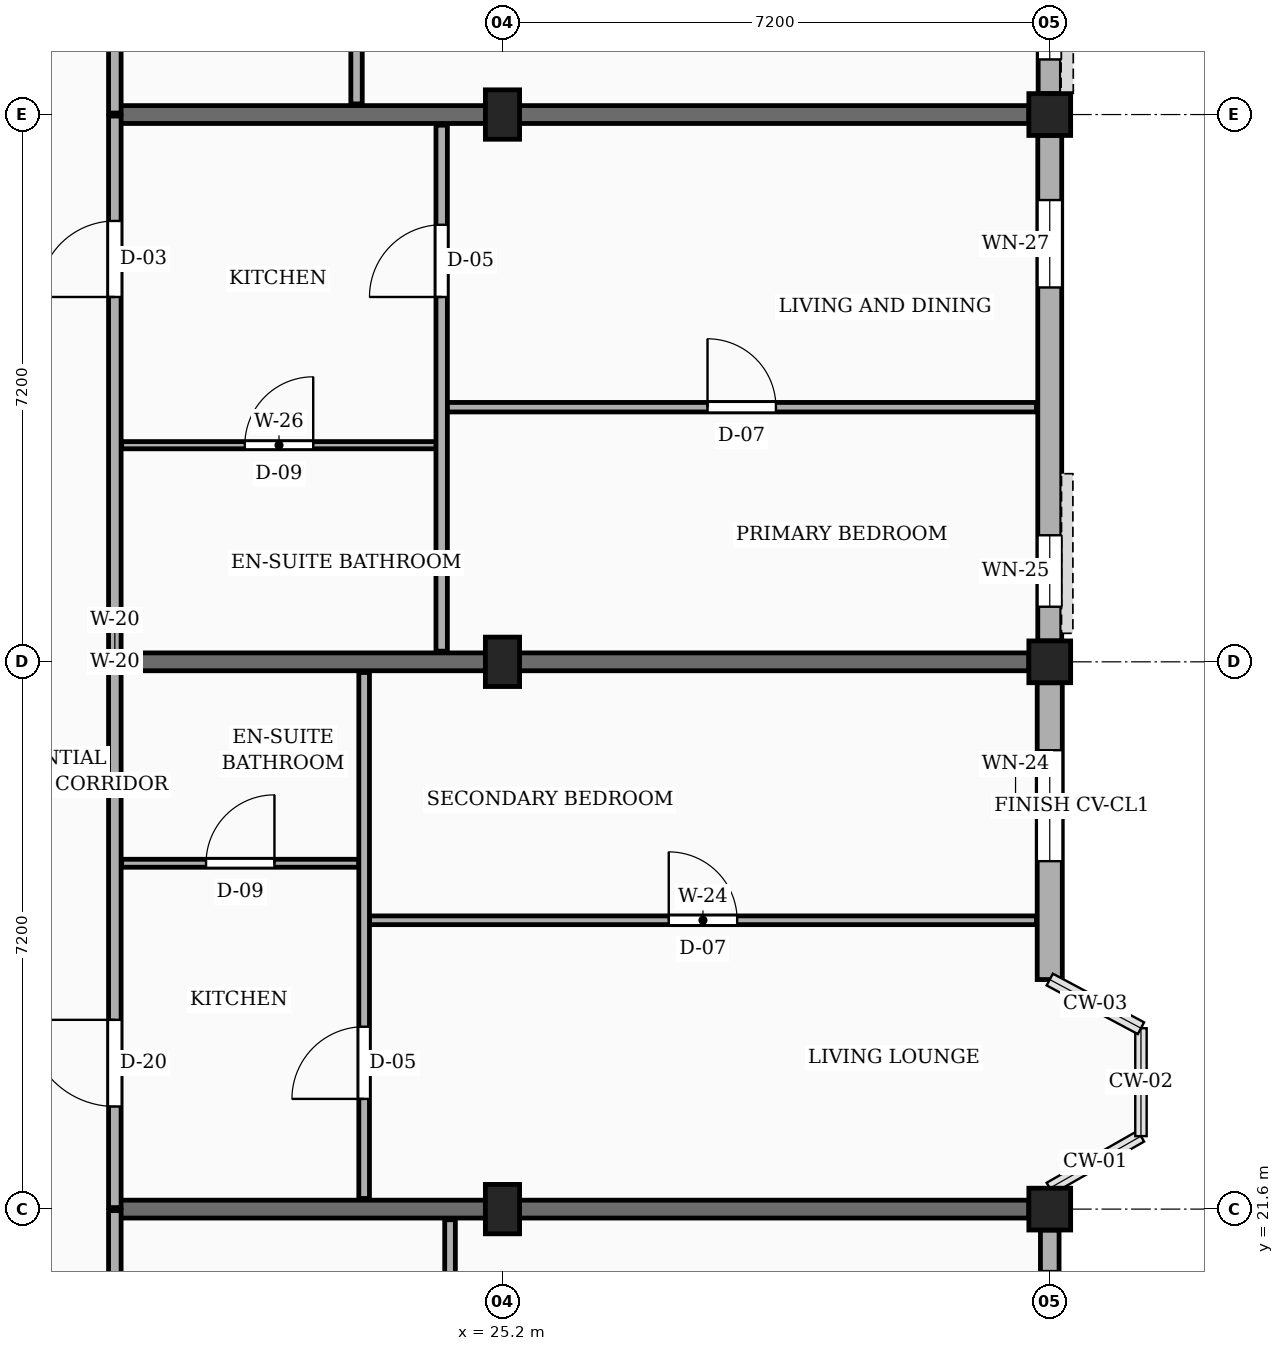
"""IFC4 building model, lengths in metres.
Left out: names, types, materials, properties, quantities, classifications, styles, units other than length and angle.
Written with IfcOpenShell. Run it as: python <this file> out.ifc"""

import sys

from ifc_helpers import new_model, si_unit, direction, frame, frame_2d, origin, origin_2d, place, context, subcontext, project, spatial, rectangle, extrude, element, fill, save


model = new_model("IFC4")
c1 = context("Model", 3, precision=1e-05, world=origin(), true_north=direction((0.0, 1.0)))
c2 = subcontext(c1, "Body", "Model", "MODEL_VIEW")
j1 = project(units=[si_unit("LENGTHUNIT", "METRE"), si_unit("PLANEANGLEUNIT", "RADIAN")], contexts=[c1])
p1 = place(None, origin())
s1 = spatial("IfcSite", under=j1, at=p1, CompositionType="ELEMENT")
p2 = place(p1, origin())
s2 = spatial("IfcBuilding", under=s1, at=p2, CompositionType="ELEMENT")
p3 = place(p2, frame((0.0, 0.0, 17.1)))
s3 = spatial("IfcBuildingStorey", under=s2, at=p3, CompositionType="ELEMENT", Elevation=17.1)
for number, where, z_axis, x_axis in (
    (1, (25.2, 21.6, 0.0), (0.0, 0.0, 1.0), (1.0, 0.0, 0.0)),
    (2, (25.2, 28.8, 0.0), (0.0, 0.0, 1.0), (1.0, 0.0, 0.0)),
    (3, (25.2, 36.0, 0.0), (0.0, 0.0, 1.0), (1.0, 0.0, 0.0)),
):
    element("IfcColumn", number, at=place(p3, frame(where, z_axis=z_axis, x_axis=x_axis)), inside=s3, PredefinedType="COLUMN", context=c2, shape_type="SweptSolid", body=[
        extrude(rectangle(XDim=0.45, YDim=0.65, at=origin_2d()), origin(), (0.0, 0.0, 1.0), 3.15),
    ])
for number, where, z_axis, x_axis in (
    (4, (32.4, 21.6, 0.0), (0.0, 0.0, 1.0), (1.0, 0.0, 0.0)),
    (5, (32.4, 28.8, 0.0), (0.0, 0.0, 1.0), (1.0, 0.0, 0.0)),
    (6, (32.4, 36.0, 0.0), (0.0, 0.0, 1.0), (1.0, 0.0, 0.0)),
):
    element("IfcColumn", number, at=place(p3, frame(where, z_axis=z_axis, x_axis=x_axis)), inside=s3, PredefinedType="COLUMN", context=c2, shape_type="SweptSolid", body=[
        extrude(rectangle(XDim=0.55, YDim=0.55, at=origin_2d()), origin(), (0.0, 0.0, 1.0), 3.15),
    ])
for number, where, z_axis, x_axis in (
    (7, (20.1, 21.6, 0.0), (0.0, 0.0, 1.0), (1.0, 0.0, 0.0)),
    (8, (20.1, 28.8, 0.0), (0.0, 0.0, 1.0), (1.0, 0.0, 0.0)),
    (9, (20.1, 36.0, 0.0), (0.0, 0.0, 1.0), (1.0, 0.0, 0.0)),
):
    element("IfcWall", number, at=place(p3, frame(where, z_axis=z_axis, x_axis=x_axis)), inside=s3, PredefinedType="SOLIDWALL", context=c2, shape_type="SweptSolid", body=[
        extrude(rectangle(XDim=12.025, YDim=0.235, at=frame_2d((6.012, 0.0))), origin(), (0.0, 0.0, 1.0), 2.17),
    ])
p4 = place(p3, frame((32.4, 14.675, 0.0), z_axis=(0.0, 0.0, 1.0), x_axis=(0.0, 1.0, 0.0)))
e10 = element("IfcWall", 10, at=p4, inside=s3, PredefinedType="SOLIDWALL", context=c2, shape_type="SweptSolid", body=[
    extrude(rectangle(XDim=6.65, YDim=0.245, at=frame_2d((3.325, 0.0))), origin(), (0.0, 0.0, 1.0), 2.44),
])
p5 = place(p4, frame((0.45, 0.0, 0.78)))
e11 = element("IfcOpeningElement", 11, at=p5, cuts=e10, PredefinedType="OPENING", context=c2, shape_type="SweptSolid", body=[
    extrude(rectangle(XDim=1.3, YDim=1.36, at=frame_2d((0.65, 0.68))), frame((0.0, 0.133, 0.0), z_axis=(0.0, -1.0, 0.0), x_axis=(1.0, 0.0, 0.0)), (0.0, 0.0, 1.0), 0.265),
])
p6 = place(p4, frame((4.65, 0.0, 0.78)))
e12 = element("IfcOpeningElement", 12, at=p6, cuts=e10, PredefinedType="OPENING", context=c2, shape_type="SweptSolid", body=[
    extrude(rectangle(XDim=1.46, YDim=1.36, at=frame_2d((0.73, 0.68))), frame((0.0, 0.133, 0.0), z_axis=(0.0, -1.0, 0.0), x_axis=(1.0, 0.0, 0.0)), (0.0, 0.0, 1.0), 0.265),
])
p7 = place(p3, frame((32.4, 24.62, 0.0), z_axis=(0.0, 0.0, 1.0), x_axis=(0.0, 1.0, 0.0)))
e13 = element("IfcWall", 13, at=p7, inside=s3, PredefinedType="SOLIDWALL", context=c2, shape_type="SweptSolid", body=[
    extrude(rectangle(XDim=3.905, YDim=0.33, at=frame_2d((1.952, 0.0))), origin(), (0.0, 0.0, 1.0), 2.44),
])
p8 = place(p7, frame((1.558, 0.0, 0.78)))
e14 = element("IfcOpeningElement", 14, at=p8, cuts=e13, PredefinedType="OPENING", context=c2, shape_type="SweptSolid", body=[
    extrude(rectangle(XDim=1.46, YDim=1.36, at=frame_2d((0.73, 0.68))), frame((0.0, 0.175, 0.0), z_axis=(0.0, -1.0, 0.0), x_axis=(1.0, 0.0, 0.0)), (0.0, 0.0, 1.0), 0.35),
])
p9 = place(p3, frame((32.4, 29.075, 0.0), z_axis=(0.0, 0.0, 1.0), x_axis=(0.0, 1.0, 0.0)))
e15 = element("IfcWall", 15, at=p9, inside=s3, PredefinedType="SOLIDWALL", context=c2, shape_type="SweptSolid", body=[
    extrude(rectangle(XDim=6.65, YDim=0.315, at=frame_2d((3.325, 0.0))), origin(), (0.0, 0.0, 1.0), 2.44),
])
p10 = place(p9, frame((0.45, 0.0, 0.78)))
e16 = element("IfcOpeningElement", 16, at=p10, cuts=e15, PredefinedType="OPENING", context=c2, shape_type="SweptSolid", body=[
    extrude(rectangle(XDim=0.94, YDim=1.44, at=frame_2d((0.47, 0.72))), frame((0.0, 0.167, 0.0), z_axis=(0.0, -1.0, 0.0), x_axis=(1.0, 0.0, 0.0)), (0.0, 0.0, 1.0), 0.335),
])
p11 = place(p9, frame((4.65, 0.0, 0.78)))
e17 = element("IfcOpeningElement", 17, at=p11, cuts=e15, PredefinedType="OPENING", context=c2, shape_type="SweptSolid", body=[
    extrude(rectangle(XDim=1.15, YDim=1.44, at=frame_2d((0.575, 0.72))), frame((0.0, 0.167, 0.0), z_axis=(0.0, -1.0, 0.0), x_axis=(1.0, 0.0, 0.0)), (0.0, 0.0, 1.0), 0.335),
])
p12 = place(p3, frame((32.4, 36.275, 0.0), z_axis=(0.0, 0.0, 1.0), x_axis=(0.0, 1.0, 0.0)))
e18 = element("IfcWall", 18, at=p12, inside=s3, PredefinedType="SOLIDWALL", context=c2, shape_type="SweptSolid", body=[
    extrude(rectangle(XDim=6.65, YDim=0.305, at=frame_2d((3.325, 0.0))), origin(), (0.0, 0.0, 1.0), 2.44),
])
p13 = place(p12, frame((0.45, 0.0, 0.78)))
e19 = element("IfcOpeningElement", 19, at=p13, cuts=e18, PredefinedType="OPENING", context=c2, shape_type="SweptSolid", body=[
    extrude(rectangle(XDim=1.15, YDim=1.44, at=frame_2d((0.575, 0.72))), frame((0.0, 0.163, 0.0), z_axis=(0.0, -1.0, 0.0), x_axis=(1.0, 0.0, 0.0)), (0.0, 0.0, 1.0), 0.325),
])
p14 = place(p12, frame((4.65, 0.0, 0.78)))
e20 = element("IfcOpeningElement", 20, at=p14, cuts=e18, PredefinedType="OPENING", context=c2, shape_type="SweptSolid", body=[
    extrude(rectangle(XDim=1.35, YDim=1.44, at=frame_2d((0.675, 0.72))), frame((0.0, 0.163, 0.0), z_axis=(0.0, -1.0, 0.0), x_axis=(1.0, 0.0, 0.0)), (0.0, 0.0, 1.0), 0.325),
])
p15 = place(p3, frame((20.1, 14.42, 0.0), z_axis=(0.0, 0.0, 1.0), x_axis=(0.0, 1.0, 0.0)))
e21 = element("IfcWall", 21, at=p15, inside=s3, PredefinedType="PARTITIONING", context=c2, shape_type="SweptSolid", body=[
    extrude(rectangle(XDim=7.16, YDim=0.165, at=frame_2d((3.58, 0.0))), origin(), (0.0, 0.0, 1.0), 2.305),
])
p16 = place(p15, frame((4.78, 0.0, 0.0)))
e22 = element("IfcOpeningElement", 22, at=p16, cuts=e21, PredefinedType="OPENING", context=c2, shape_type="SweptSolid", body=[
    extrude(rectangle(XDim=0.94, YDim=2.12, at=frame_2d((0.47, 1.06))), frame((0.0, 0.093, 0.0), z_axis=(0.0, -1.0, 0.0), x_axis=(1.0, 0.0, 0.0)), (0.0, 0.0, 1.0), 0.185),
])
p17 = place(p3, frame((20.1, 21.62, 0.0), z_axis=(0.0, 0.0, 1.0), x_axis=(0.0, 1.0, 0.0)))
e23 = element("IfcWall", 23, at=p17, inside=s3, PredefinedType="PARTITIONING", context=c2, shape_type="SweptSolid", body=[
    extrude(rectangle(XDim=7.16, YDim=0.165, at=frame_2d((3.58, 0.0))), origin(), (0.0, 0.0, 1.0), 2.305),
])
p18 = place(p17, frame((1.33, 0.0, 0.0)))
e24 = element("IfcOpeningElement", 24, at=p18, cuts=e23, PredefinedType="OPENING", context=c2, shape_type="SweptSolid", body=[
    extrude(rectangle(XDim=1.14, YDim=2.18, at=frame_2d((0.57, 1.09))), frame((0.0, 0.093, 0.0), z_axis=(0.0, -1.0, 0.0), x_axis=(1.0, 0.0, 0.0)), (0.0, 0.0, 1.0), 0.185),
])
p19 = place(p3, frame((20.1, 28.82, 0.0), z_axis=(0.0, 0.0, 1.0), x_axis=(0.0, 1.0, 0.0)))
e25 = element("IfcWall", 25, at=p19, inside=s3, PredefinedType="PARTITIONING", context=c2, shape_type="SweptSolid", body=[
    extrude(rectangle(XDim=7.16, YDim=0.165, at=frame_2d((3.58, 0.0))), origin(), (0.0, 0.0, 1.0), 2.305),
])
p20 = place(p19, frame((4.78, 0.0, 0.0)))
e26 = element("IfcOpeningElement", 26, at=p20, cuts=e25, PredefinedType="OPENING", context=c2, shape_type="SweptSolid", body=[
    extrude(rectangle(XDim=1.0, YDim=2.15, at=frame_2d((0.5, 1.075))), frame((0.0, 0.093, 0.0), z_axis=(0.0, -1.0, 0.0), x_axis=(1.0, 0.0, 0.0)), (0.0, 0.0, 1.0), 0.185),
])
p21 = place(p3, frame((20.1, 36.02, 0.0), z_axis=(0.0, 0.0, 1.0), x_axis=(0.0, 1.0, 0.0)))
e27 = element("IfcWall", 27, at=p21, inside=s3, PredefinedType="PARTITIONING", context=c2, shape_type="SweptSolid", body=[
    extrude(rectangle(XDim=7.16, YDim=0.165, at=frame_2d((3.58, 0.0))), origin(), (0.0, 0.0, 1.0), 2.305),
])
p22 = place(p21, frame((1.33, 0.0, 0.0)))
e28 = element("IfcOpeningElement", 28, at=p22, cuts=e27, PredefinedType="OPENING", context=c2, shape_type="SweptSolid", body=[
    extrude(rectangle(XDim=0.94, YDim=2.12, at=frame_2d((0.47, 1.06))), frame((0.0, 0.093, 0.0), z_axis=(0.0, -1.0, 0.0), x_axis=(1.0, 0.0, 0.0)), (0.0, 0.0, 1.0), 0.185),
])
p23 = place(p3, frame((24.51, 14.54, 0.0), z_axis=(0.0, 0.0, 1.0), x_axis=(0.0, 1.0, 0.0)))
e29 = element("IfcWall", 29, at=p23, inside=s3, PredefinedType="PARTITIONING", context=c2, shape_type="SweptSolid", body=[
    extrude(rectangle(XDim=6.92, YDim=0.14, at=frame_2d((3.46, 0.0))), origin(), (0.0, 0.0, 1.0), 2.305),
])
p24 = place(p23, frame((4.66, 0.0, 0.0)))
e30 = element("IfcOpeningElement", 30, at=p24, cuts=e29, PredefinedType="OPENING", context=c2, shape_type="SweptSolid", body=[
    extrude(rectangle(XDim=0.92, YDim=2.1, at=frame_2d((0.46, 1.05))), frame((0.0, 0.08, 0.0), z_axis=(0.0, -1.0, 0.0), x_axis=(1.0, 0.0, 0.0)), (0.0, 0.0, 1.0), 0.16),
])
p25 = place(p3, frame((23.45, 25.4, 0.0), z_axis=(0.0, 0.0, 1.0), x_axis=(1.0, 0.0, 0.0)))
e31 = element("IfcWall", 31, at=p25, inside=s3, PredefinedType="PARTITIONING", context=c2, shape_type="SweptSolid", body=[
    extrude(rectangle(XDim=8.775, YDim=0.115, at=frame_2d((4.388, 0.0))), origin(), (0.0, 0.0, 1.0), 2.305),
])
p26 = place(p25, frame((3.938, 0.0, 0.0)))
e32 = element("IfcOpeningElement", 32, at=p26, cuts=e31, PredefinedType="OPENING", context=c2, shape_type="SweptSolid", body=[
    extrude(rectangle(XDim=0.9, YDim=2.1, at=frame_2d((0.45, 1.05))), frame((0.0, 0.067, 0.0), z_axis=(0.0, -1.0, 0.0), x_axis=(1.0, 0.0, 0.0)), (0.0, 0.0, 1.0), 0.135),
])
p27 = place(p3, frame((20.19, 26.15, 0.0), z_axis=(0.0, 0.0, 1.0), x_axis=(1.0, 0.0, 0.0)))
e33 = element("IfcWall", 33, at=p27, inside=s3, PredefinedType="PARTITIONING", context=c2, shape_type="SweptSolid", body=[
    extrude(rectangle(XDim=3.12, YDim=0.105, at=frame_2d((1.56, 0.0))), origin(), (0.0, 0.0, 1.0), 2.305),
])
p28 = place(p27, frame((1.11, 0.0, 0.0)))
e34 = element("IfcOpeningElement", 34, at=p28, cuts=e33, PredefinedType="OPENING", context=c2, shape_type="SweptSolid", body=[
    extrude(rectangle(XDim=0.9, YDim=2.05, at=frame_2d((0.45, 1.025))), frame((0.0, 0.062, 0.0), z_axis=(0.0, -1.0, 0.0), x_axis=(1.0, 0.0, 0.0)), (0.0, 0.0, 1.0), 0.125),
])
p29 = place(p3, frame((23.38, 21.74, 0.0), z_axis=(0.0, 0.0, 1.0), x_axis=(0.0, 1.0, 0.0)))
e35 = element("IfcWall", 35, at=p29, inside=s3, PredefinedType="PARTITIONING", context=c2, shape_type="SweptSolid", body=[
    extrude(rectangle(XDim=6.92, YDim=0.14, at=frame_2d((3.46, 0.0))), origin(), (0.0, 0.0, 1.0), 2.305),
])
p30 = place(p29, frame((1.31, 0.0, 0.0)))
e36 = element("IfcOpeningElement", 36, at=p30, cuts=e35, PredefinedType="OPENING", context=c2, shape_type="SweptSolid", body=[
    extrude(rectangle(XDim=0.95, YDim=2.1, at=frame_2d((0.475, 1.05))), frame((0.0, 0.08, 0.0), z_axis=(0.0, -1.0, 0.0), x_axis=(1.0, 0.0, 0.0)), (0.0, 0.0, 1.0), 0.16),
])
p31 = place(p3, frame((24.47, 32.15, 0.0), z_axis=(0.0, 0.0, 1.0), x_axis=(1.0, 0.0, 0.0)))
e37 = element("IfcWall", 37, at=p31, inside=s3, PredefinedType="PARTITIONING", context=c2, shape_type="SweptSolid", body=[
    extrude(rectangle(XDim=7.755, YDim=0.125, at=frame_2d((3.877, 0.0))), origin(), (0.0, 0.0, 1.0), 2.305),
])
p32 = place(p31, frame((3.427, 0.0, 0.0)))
e38 = element("IfcOpeningElement", 38, at=p32, cuts=e37, PredefinedType="OPENING", context=c2, shape_type="SweptSolid", body=[
    extrude(rectangle(XDim=0.9, YDim=2.1, at=frame_2d((0.45, 1.05))), frame((0.0, 0.073, 0.0), z_axis=(0.0, -1.0, 0.0), x_axis=(1.0, 0.0, 0.0)), (0.0, 0.0, 1.0), 0.145),
])
p33 = place(p3, frame((20.19, 31.65, 0.0), z_axis=(0.0, 0.0, 1.0), x_axis=(1.0, 0.0, 0.0)))
e39 = element("IfcWall", 39, at=p33, inside=s3, PredefinedType="PARTITIONING", context=c2, shape_type="SweptSolid", body=[
    extrude(rectangle(XDim=4.14, YDim=0.095, at=frame_2d((2.07, 0.0))), origin(), (0.0, 0.0, 1.0), 2.305),
])
p34 = place(p33, frame((1.62, 0.0, 0.0)))
e40 = element("IfcOpeningElement", 40, at=p34, cuts=e39, PredefinedType="OPENING", context=c2, shape_type="SweptSolid", body=[
    extrude(rectangle(XDim=0.9, YDim=2.05, at=frame_2d((0.45, 1.025))), frame((0.0, 0.058, 0.0), z_axis=(0.0, -1.0, 0.0), x_axis=(1.0, 0.0, 0.0)), (0.0, 0.0, 1.0), 0.115),
])
p35 = place(p3, frame((24.4, 28.94, 0.0), z_axis=(0.0, 0.0, 1.0), x_axis=(0.0, 1.0, 0.0)))
e41 = element("IfcWall", 41, at=p35, inside=s3, PredefinedType="PARTITIONING", context=c2, shape_type="SweptSolid", body=[
    extrude(rectangle(XDim=6.92, YDim=0.15, at=frame_2d((3.46, 0.0))), origin(), (0.0, 0.0, 1.0), 2.305),
])
p36 = place(p35, frame((4.66, 0.0, 0.0)))
e42 = element("IfcOpeningElement", 42, at=p36, cuts=e41, PredefinedType="OPENING", context=c2, shape_type="SweptSolid", body=[
    extrude(rectangle(XDim=0.95, YDim=2.1, at=frame_2d((0.475, 1.05))), frame((0.0, 0.085, 0.0), z_axis=(0.0, -1.0, 0.0), x_axis=(1.0, 0.0, 0.0)), (0.0, 0.0, 1.0), 0.17),
])
p37 = place(p3, frame((23.28, 36.14, 0.0), z_axis=(0.0, 0.0, 1.0), x_axis=(0.0, 1.0, 0.0)))
e43 = element("IfcWall", 43, at=p37, inside=s3, PredefinedType="PARTITIONING", context=c2, shape_type="SweptSolid", body=[
    extrude(rectangle(XDim=6.92, YDim=0.15, at=frame_2d((3.46, 0.0))), origin(), (0.0, 0.0, 1.0), 2.305),
])
p38 = place(p37, frame((1.31, 0.0, 0.0)))
e44 = element("IfcOpeningElement", 44, at=p38, cuts=e43, PredefinedType="OPENING", context=c2, shape_type="SweptSolid", body=[
    extrude(rectangle(XDim=0.92, YDim=2.1, at=frame_2d((0.46, 1.05))), frame((0.0, 0.085, 0.0), z_axis=(0.0, -1.0, 0.0), x_axis=(1.0, 0.0, 0.0)), (0.0, 0.0, 1.0), 0.17),
])
p39 = place(p6, origin())
e45 = element("IfcWindow", 45, at=p39, inside=s3, PartitioningType="SINGLE_PANEL", PredefinedType="WINDOW", context=c2, shape_type="SweptSolid", body=[
    extrude(rectangle(XDim=1.46, YDim=1.36, at=frame_2d((0.73, 0.68))), frame((0.0, 0.03, 0.0), z_axis=(0.0, -1.0, 0.0), x_axis=(1.0, 0.0, 0.0)), (0.0, 0.0, 1.0), 0.06),
])
fill(e12, e45)
p40 = place(p8, origin())
e46 = element("IfcWindow", 46, at=p40, inside=s3, PartitioningType="SINGLE_PANEL", PredefinedType="WINDOW", context=c2, shape_type="SweptSolid", body=[
    extrude(rectangle(XDim=1.46, YDim=1.36, at=frame_2d((0.73, 0.68))), frame((0.0, 0.03, 0.0), z_axis=(0.0, -1.0, 0.0), x_axis=(1.0, 0.0, 0.0)), (0.0, 0.0, 1.0), 0.06),
])
fill(e14, e46)
p41 = place(p10, origin())
e47 = element("IfcWindow", 47, at=p41, inside=s3, PartitioningType="SINGLE_PANEL", PredefinedType="WINDOW", context=c2, shape_type="SweptSolid", body=[
    extrude(rectangle(XDim=0.94, YDim=1.44, at=frame_2d((0.47, 0.72))), frame((0.0, 0.03, 0.0), z_axis=(0.0, -1.0, 0.0), x_axis=(1.0, 0.0, 0.0)), (0.0, 0.0, 1.0), 0.06),
])
fill(e16, e47)
p42 = place(p11, origin())
e48 = element("IfcWindow", 48, at=p42, inside=s3, PartitioningType="SINGLE_PANEL", PredefinedType="WINDOW", context=c2, shape_type="SweptSolid", body=[
    extrude(rectangle(XDim=1.15, YDim=1.44, at=frame_2d((0.575, 0.72))), frame((0.0, 0.03, 0.0), z_axis=(0.0, -1.0, 0.0), x_axis=(1.0, 0.0, 0.0)), (0.0, 0.0, 1.0), 0.06),
])
fill(e17, e48)
p43 = place(p13, origin())
e49 = element("IfcWindow", 49, at=p43, inside=s3, PartitioningType="SINGLE_PANEL", PredefinedType="WINDOW", context=c2, shape_type="SweptSolid", body=[
    extrude(rectangle(XDim=1.15, YDim=1.44, at=frame_2d((0.575, 0.72))), frame((0.0, 0.03, 0.0), z_axis=(0.0, -1.0, 0.0), x_axis=(1.0, 0.0, 0.0)), (0.0, 0.0, 1.0), 0.06),
])
fill(e19, e49)
p44 = place(p18, origin())
e50 = element("IfcDoor", 50, at=p44, inside=s3, OperationType="SINGLE_SWING_RIGHT", PredefinedType="DOOR", context=c2, shape_type="SweptSolid", body=[
    extrude(rectangle(XDim=1.14, YDim=2.18, at=frame_2d((0.57, 1.09))), frame((0.0, 0.025, 0.0), z_axis=(0.0, -1.0, 0.0), x_axis=(1.0, 0.0, 0.0)), (0.0, 0.0, 1.0), 0.05),
])
fill(e24, e50)
p45 = place(p20, origin())
e51 = element("IfcDoor", 51, at=p45, inside=s3, OperationType="SINGLE_SWING_LEFT", PredefinedType="DOOR", context=c2, shape_type="SweptSolid", body=[
    extrude(rectangle(XDim=1.0, YDim=2.15, at=frame_2d((0.5, 1.075))), frame((0.0, 0.025, 0.0), z_axis=(0.0, -1.0, 0.0), x_axis=(1.0, 0.0, 0.0)), (0.0, 0.0, 1.0), 0.05),
])
fill(e26, e51)
p46 = place(p26, origin())
e52 = element("IfcDoor", 52, at=p46, inside=s3, OperationType="SINGLE_SWING_LEFT", PredefinedType="DOOR", context=c2, shape_type="SweptSolid", body=[
    extrude(rectangle(XDim=0.9, YDim=2.1, at=frame_2d((0.45, 1.05))), frame((0.0, 0.025, 0.0), z_axis=(0.0, -1.0, 0.0), x_axis=(1.0, 0.0, 0.0)), (0.0, 0.0, 1.0), 0.05),
])
fill(e32, e52)
p47 = place(p28, origin())
e53 = element("IfcDoor", 53, at=p47, inside=s3, OperationType="SINGLE_SWING_RIGHT", PredefinedType="DOOR", context=c2, shape_type="SweptSolid", body=[
    extrude(rectangle(XDim=0.9, YDim=2.05, at=frame_2d((0.45, 1.025))), frame((0.0, 0.025, 0.0), z_axis=(0.0, -1.0, 0.0), x_axis=(1.0, 0.0, 0.0)), (0.0, 0.0, 1.0), 0.05),
])
fill(e34, e53)
p48 = place(p30, origin())
e54 = element("IfcDoor", 54, at=p48, inside=s3, OperationType="SINGLE_SWING_LEFT", PredefinedType="DOOR", context=c2, shape_type="SweptSolid", body=[
    extrude(rectangle(XDim=0.95, YDim=2.1, at=frame_2d((0.475, 1.05))), frame((0.0, 0.025, 0.0), z_axis=(0.0, -1.0, 0.0), x_axis=(1.0, 0.0, 0.0)), (0.0, 0.0, 1.0), 0.05),
])
fill(e36, e54)
p49 = place(p32, origin())
e55 = element("IfcDoor", 55, at=p49, inside=s3, OperationType="SINGLE_SWING_LEFT", PredefinedType="DOOR", context=c2, shape_type="SweptSolid", body=[
    extrude(rectangle(XDim=0.9, YDim=2.1, at=frame_2d((0.45, 1.05))), frame((0.0, 0.025, 0.0), z_axis=(0.0, -1.0, 0.0), x_axis=(1.0, 0.0, 0.0)), (0.0, 0.0, 1.0), 0.05),
])
fill(e38, e55)
p50 = place(p34, origin())
e56 = element("IfcDoor", 56, at=p50, inside=s3, OperationType="SINGLE_SWING_RIGHT", PredefinedType="DOOR", context=c2, shape_type="SweptSolid", body=[
    extrude(rectangle(XDim=0.9, YDim=2.05, at=frame_2d((0.45, 1.025))), frame((0.0, 0.025, 0.0), z_axis=(0.0, -1.0, 0.0), x_axis=(1.0, 0.0, 0.0)), (0.0, 0.0, 1.0), 0.05),
])
fill(e40, e56)
p51 = place(p36, origin())
e57 = element("IfcDoor", 57, at=p51, inside=s3, OperationType="SINGLE_SWING_LEFT", PredefinedType="DOOR", context=c2, shape_type="SweptSolid", body=[
    extrude(rectangle(XDim=0.95, YDim=2.1, at=frame_2d((0.475, 1.05))), frame((0.0, 0.025, 0.0), z_axis=(0.0, -1.0, 0.0), x_axis=(1.0, 0.0, 0.0)), (0.0, 0.0, 1.0), 0.05),
])
fill(e42, e57)
save(model, sys.argv[1])
